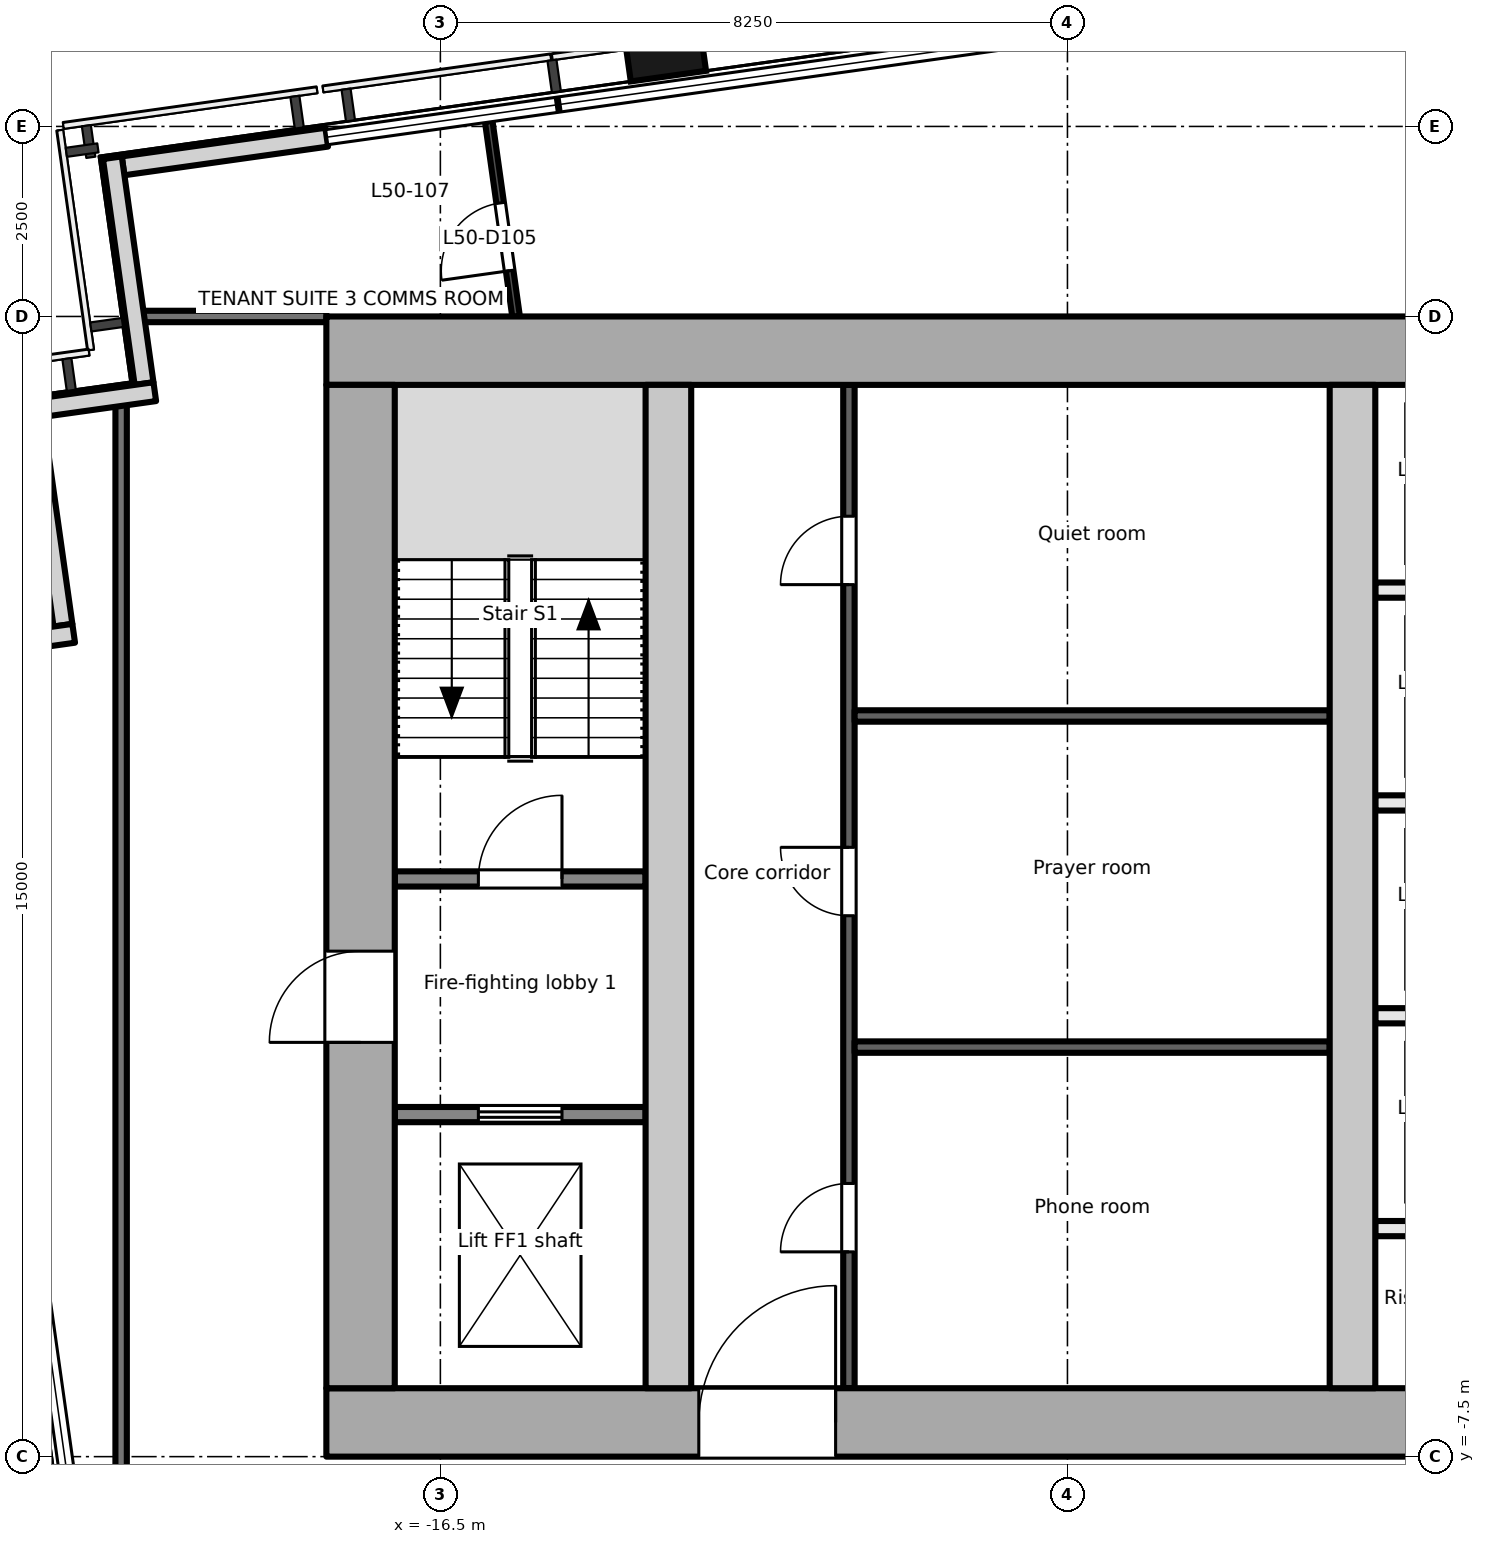
"""IFC4 building model, lengths in metres.
Left out: names, types, materials, properties, quantities, classifications, styles, units other than length and angle.
Written with IfcOpenShell. Run it as: python <this file> out.ifc"""

import sys

from ifc_helpers import new_model, si_unit, direction, frame, frame_2d, origin, origin_2d, place, context, subcontext, project, spatial, rectangle, extrude, element, fill, save


model = new_model("IFC4")
c1 = context("Model", 3, precision=1e-05, world=origin(), true_north=direction((0.0, 1.0)))
c2 = subcontext(c1, "Body", "Model", "MODEL_VIEW")
j1 = project(units=[si_unit("LENGTHUNIT", "METRE"), si_unit("PLANEANGLEUNIT", "RADIAN")], contexts=[c1])
p1 = place(None, origin())
s1 = spatial("IfcSite", under=j1, at=p1, CompositionType="ELEMENT")
p2 = place(p1, origin())
s2 = spatial("IfcBuilding", under=s1, at=p2, CompositionType="ELEMENT")
p3 = place(p2, frame((0.0, 0.0, 221.3)))
s3 = spatial("IfcBuildingStorey", under=s2, at=p3, CompositionType="ELEMENT", Elevation=221.3)
p4 = place(p3, frame((-13.625, 11.553, -0.2), z_axis=(0.0, 0.0, 1.0), x_axis=(0.990268068742, 0.13917310096, 0.0)))
e1 = element("IfcColumn", 1, at=p4, inside=s3, PredefinedType="COLUMN", context=c2, shape_type="SweptSolid", body=[
    extrude(rectangle(XDim=1.0, YDim=1.8, at=origin_2d()), origin(), (0.0, 0.0, 1.0), 3.9),
])
p5 = place(p3, frame((-17.995, 9.859, 0.0), z_axis=(0.0, 0.0, 1.0), x_axis=(-0.99024510326, -0.139336411139, 0.0)))
e2 = element("IfcWall", 2, at=p5, inside=s3, PredefinedType="SOLIDWALL", context=c2, shape_type="SweptSolid", body=[
    extrude(rectangle(XDim=2.705, YDim=0.25, at=frame_2d((1.353, 0.0))), origin(), (0.0, 0.0, 1.0), 3.7),
])
p6 = place(p3, frame((-20.815, 9.588, 0.0), z_axis=(0.0, 0.0, 1.0), x_axis=(0.138983028379, -0.9902947631, 0.0)))
e3 = element("IfcWall", 3, at=p6, inside=s3, PredefinedType="SOLIDWALL", context=c2, shape_type="SweptSolid", body=[
    extrude(rectangle(XDim=3.0, YDim=0.25, at=frame_2d((1.5, 0.0))), origin(), (0.0, 0.0, 1.0), 3.7),
])
p7 = place(p3, frame((-20.257, 6.51, 0.0), z_axis=(0.0, 0.0, 1.0), x_axis=(-0.990330117064, -0.138730887823, 0.0)))
e4 = element("IfcWall", 4, at=p7, inside=s3, PredefinedType="SOLIDWALL", context=c2, shape_type="SweptSolid", body=[
    extrude(rectangle(XDim=1.499, YDim=0.25, at=frame_2d((0.75, 0.0))), origin(), (0.0, 0.0, 1.0), 3.7),
])
p8 = place(p3, frame((-21.883, 6.409, 0.0), z_axis=(0.0, 0.0, 1.0), x_axis=(0.139324658755, -0.990246756855, 0.0)))
e5 = element("IfcWall", 5, at=p8, inside=s3, PredefinedType="SOLIDWALL", context=c2, shape_type="SweptSolid", body=[
    extrude(rectangle(XDim=3.0, YDim=0.25, at=frame_2d((1.5, 0.0))), origin(), (0.0, 0.0, 1.0), 3.7),
])
p9 = place(p3, frame((-21.324, 3.332, 0.0), z_axis=(0.0, 0.0, 1.0), x_axis=(-0.990238641016, -0.139382329723, 0.0)))
e6 = element("IfcWall", 6, at=p9, inside=s3, PredefinedType="SOLIDWALL", context=c2, shape_type="SweptSolid", body=[
    extrude(rectangle(XDim=1.526, YDim=0.25, at=frame_2d((0.763, 0.0))), origin(), (0.0, 0.0, 1.0), 3.7),
])
p10 = place(p3, frame((-18.0, -7.05, -0.2), z_axis=(0.0, 0.0, 1.0), x_axis=(1.0, 0.0, 0.0)))
e7 = element("IfcWall", 7, at=p10, inside=s3, PredefinedType="SHEAR", context=c2, shape_type="SweptSolid", body=[
    extrude(rectangle(XDim=36.0, YDim=0.9, at=frame_2d((18.0, 0.0))), origin(), (0.0, 0.0, 1.0), 3.9),
])
p11 = place(p10, frame((4.9, 0.0, 0.2)))
e8 = element("IfcOpeningElement", 8, at=p11, cuts=e7, PredefinedType="OPENING", context=c2, shape_type="SweptSolid", body=[
    extrude(rectangle(XDim=1.8, YDim=2.1, at=frame_2d((0.9, 1.05))), frame((0.0, 0.46, 0.0), z_axis=(0.0, -1.0, 0.0), x_axis=(1.0, 0.0, 0.0)), (0.0, 0.0, 1.0), 0.921),
])
p12 = place(p10, frame((16.8, 0.0, 0.2)))
e9 = element("IfcOpeningElement", 9, at=p12, cuts=e7, PredefinedType="OPENING", context=c2, shape_type="SweptSolid", body=[
    extrude(rectangle(XDim=2.4, YDim=2.1, at=frame_2d((1.2, 1.05))), frame((0.0, 0.46, 0.0), z_axis=(0.0, -1.0, 0.0), x_axis=(1.0, 0.0, 0.0)), (0.0, 0.0, 1.0), 0.921),
])
p13 = place(p10, frame((26.1, 0.0, 0.2)))
e10 = element("IfcOpeningElement", 10, at=p13, cuts=e7, PredefinedType="OPENING", context=c2, shape_type="SweptSolid", body=[
    extrude(rectangle(XDim=2.4, YDim=2.1, at=frame_2d((1.2, 1.05))), frame((0.0, 0.46, 0.0), z_axis=(0.0, -1.0, 0.0), x_axis=(1.0, 0.0, 0.0)), (0.0, 0.0, 1.0), 0.921),
])
p14 = place(p3, frame((-18.0, 7.05, -0.2), z_axis=(0.0, 0.0, 1.0), x_axis=(1.0, 0.0, 0.0)))
e11 = element("IfcWall", 11, at=p14, inside=s3, PredefinedType="SHEAR", context=c2, shape_type="SweptSolid", body=[
    extrude(rectangle(XDim=36.0, YDim=0.9, at=frame_2d((18.0, 0.0))), origin(), (0.0, 0.0, 1.0), 3.9),
])
p15 = place(p3, frame((-17.55, -6.6, -0.2), z_axis=(0.0, 0.0, 1.0), x_axis=(0.0, 1.0, 0.0)))
e12 = element("IfcWall", 12, at=p15, inside=s3, PredefinedType="SHEAR", context=c2, shape_type="SweptSolid", body=[
    extrude(rectangle(XDim=13.2, YDim=0.9, at=frame_2d((6.6, 0.0))), origin(), (0.0, 0.0, 1.0), 3.9),
])
p16 = place(p15, frame((4.55, 0.0, 0.2)))
e13 = element("IfcOpeningElement", 13, at=p16, cuts=e12, PredefinedType="OPENING", context=c2, shape_type="SweptSolid", body=[
    extrude(rectangle(XDim=1.2, YDim=2.1, at=frame_2d((0.6, 1.05))), frame((0.0, 0.46, 0.0), z_axis=(0.0, -1.0, 0.0), x_axis=(1.0, 0.0, 0.0)), (0.0, 0.0, 1.0), 0.921),
])
for number, where, z_axis, x_axis in (
    (14, (-13.5, -6.6, -0.2), (0.0, 0.0, 1.0), (0.0, 1.0, 0.0)),
    (15, (-4.5, -6.6, -0.2), (0.0, 0.0, 1.0), (0.0, 1.0, 0.0)),
):
    element("IfcWall", number, at=place(p3, frame(where, z_axis=z_axis, x_axis=x_axis)), inside=s3, PredefinedType="SHEAR", context=c2, shape_type="SweptSolid", body=[
        extrude(rectangle(XDim=13.2, YDim=0.6, at=frame_2d((6.6, 0.0))), origin(), (0.0, 0.0, 1.0), 3.9),
    ])
p17 = place(p3, frame((-17.1, -3.0, 0.0), z_axis=(0.0, 0.0, 1.0), x_axis=(1.0, 0.0, 0.0)))
e16 = element("IfcWall", 16, at=p17, inside=s3, PredefinedType="PARTITIONING", context=c2, shape_type="SweptSolid", body=[
    extrude(rectangle(XDim=3.3, YDim=0.2, at=frame_2d((1.65, 0.0))), origin(), (0.0, 0.0, 1.0), 3.7),
])
p18 = place(p17, frame((1.1, 0.0, 0.0)))
e17 = element("IfcOpeningElement", 17, at=p18, cuts=e16, PredefinedType="OPENING", context=c2, shape_type="SweptSolid", body=[
    extrude(rectangle(XDim=1.1, YDim=2.1, at=frame_2d((0.55, 1.05))), frame((0.0, 0.111, 0.0), z_axis=(0.0, -1.0, 0.0), x_axis=(1.0, 0.0, 0.0)), (0.0, 0.0, 1.0), 0.221),
])
p19 = place(p3, frame((-17.1, 0.1, 0.0), z_axis=(0.0, 0.0, 1.0), x_axis=(1.0, 0.0, 0.0)))
e18 = element("IfcWall", 18, at=p19, inside=s3, PredefinedType="PARTITIONING", context=c2, shape_type="SweptSolid", body=[
    extrude(rectangle(XDim=3.3, YDim=0.2, at=frame_2d((1.65, 0.0))), origin(), (0.0, 0.0, 1.0), 3.7),
])
p20 = place(p19, frame((1.1, 0.0, 0.0)))
e19 = element("IfcOpeningElement", 19, at=p20, cuts=e18, PredefinedType="OPENING", context=c2, shape_type="SweptSolid", body=[
    extrude(rectangle(XDim=1.1, YDim=2.1, at=frame_2d((0.55, 1.05))), frame((0.0, 0.111, 0.0), z_axis=(0.0, -1.0, 0.0), x_axis=(1.0, 0.0, 0.0)), (0.0, 0.0, 1.0), 0.221),
])
p21 = place(p3, frame((-11.125, -6.6, 0.0), z_axis=(0.0, 0.0, 1.0), x_axis=(0.0, 1.0, 0.0)))
e20 = element("IfcWall", 20, at=p21, inside=s3, PredefinedType="PARTITIONING", context=c2, shape_type="SweptSolid", body=[
    extrude(rectangle(XDim=13.2, YDim=0.15, at=frame_2d((6.6, 0.0))), origin(), (0.0, 0.0, 1.0), 3.7),
])
p22 = place(p21, frame((1.794, 0.0, 0.0)))
e21 = element("IfcOpeningElement", 21, at=p22, cuts=e20, PredefinedType="OPENING", context=c2, shape_type="SweptSolid", body=[
    extrude(rectangle(XDim=0.9, YDim=2.1, at=frame_2d((0.45, 1.05))), frame((0.0, 0.085, 0.0), z_axis=(0.0, -1.0, 0.0), x_axis=(1.0, 0.0, 0.0)), (0.0, 0.0, 1.0), 0.171),
])
p23 = place(p21, frame((6.216, 0.0, 0.0)))
e22 = element("IfcOpeningElement", 22, at=p23, cuts=e20, PredefinedType="OPENING", context=c2, shape_type="SweptSolid", body=[
    extrude(rectangle(XDim=0.9, YDim=2.1, at=frame_2d((0.45, 1.05))), frame((0.0, 0.085, 0.0), z_axis=(0.0, -1.0, 0.0), x_axis=(1.0, 0.0, 0.0)), (0.0, 0.0, 1.0), 0.171),
])
p24 = place(p21, frame((10.572, 0.0, 0.0)))
e23 = element("IfcOpeningElement", 23, at=p24, cuts=e20, PredefinedType="OPENING", context=c2, shape_type="SweptSolid", body=[
    extrude(rectangle(XDim=0.9, YDim=2.1, at=frame_2d((0.45, 1.05))), frame((0.0, 0.085, 0.0), z_axis=(0.0, -1.0, 0.0), x_axis=(1.0, 0.0, 0.0)), (0.0, 0.0, 1.0), 0.171),
])
for number, where, z_axis, x_axis in (
    (24, (-11.05, -2.112, 0.0), (0.0, 0.0, 1.0), (1.0, 0.0, 0.0)),
    (25, (-11.05, 2.244, 0.0), (0.0, 0.0, 1.0), (1.0, 0.0, 0.0)),
):
    element("IfcWall", number, at=place(p3, frame(where, z_axis=z_axis, x_axis=x_axis)), inside=s3, PredefinedType="PARTITIONING", context=c2, shape_type="SweptSolid", body=[
        extrude(rectangle(XDim=6.25, YDim=0.15, at=frame_2d((3.125, 0.0))), origin(), (0.0, 0.0, 1.0), 3.7),
    ])
for number, where, z_axis, x_axis in (
    (26, (-4.2, -1.7, 0.0), (0.0, 0.0, 1.0), (1.0, 0.0, 0.0)),
    (27, (-4.2, 1.1, 0.0), (0.0, 0.0, 1.0), (1.0, 0.0, 0.0)),
    (28, (-4.2, 3.9, 0.0), (0.0, 0.0, 1.0), (1.0, 0.0, 0.0)),
    (29, (-4.2, -4.5, 0.0), (0.0, 0.0, 1.0), (1.0, 0.0, 0.0)),
):
    element("IfcWall", number, at=place(p3, frame(where, z_axis=z_axis, x_axis=x_axis)), inside=s3, PredefinedType="PARTITIONING", context=c2, shape_type="SweptSolid", body=[
        extrude(rectangle(XDim=2.3, YDim=0.2, at=frame_2d((1.15, 0.0))), origin(), (0.0, 0.0, 1.0), 3.7),
    ])
p25 = place(p3, frame((-20.7, -10.8, 0.0), z_axis=(0.0, 0.0, 1.0), x_axis=(0.0, 1.0, 0.0)))
e30 = element("IfcWall", 30, at=p25, inside=s3, PredefinedType="PARTITIONING", context=c2, shape_type="SweptSolid", body=[
    extrude(rectangle(XDim=17.156, YDim=0.15, at=frame_2d((8.578, 0.0))), origin(), (0.0, 0.0, 1.0), 3.4),
])
p26 = place(p3, frame((-20.431, 7.5, 0.0), z_axis=(0.0, 0.0, 1.0), x_axis=(1.0, 0.0, 0.0)))
e31 = element("IfcWall", 31, at=p26, inside=s3, PredefinedType="PARTITIONING", context=c2, shape_type="SweptSolid", body=[
    extrude(rectangle(XDim=2.431, YDim=0.15, at=frame_2d((1.215, 0.0))), origin(), (0.0, 0.0, 1.0), 3.7),
])
p27 = place(p3, frame((-15.504, 7.5, 0.0), z_axis=(0.0, 0.0, 1.0), x_axis=(-0.138928669032, 0.990302390647, 0.0)))
e32 = element("IfcWall", 32, at=p27, inside=s3, PredefinedType="PARTITIONING", context=c2, shape_type="SweptSolid", body=[
    extrude(rectangle(XDim=2.592, YDim=0.1, at=frame_2d((1.296, 0.0))), origin(), (0.0, 0.0, 1.0), 3.7),
])
p28 = place(p27, frame((0.608, 0.0, 0.0)))
e33 = element("IfcOpeningElement", 33, at=p28, cuts=e32, PredefinedType="OPENING", context=c2, shape_type="SweptSolid", body=[
    extrude(rectangle(XDim=0.9, YDim=2.1, at=frame_2d((0.45, 1.05))), frame((0.0, 0.061, 0.0), z_axis=(0.0, -1.0, 0.0), x_axis=(1.0, 0.0, 0.0)), (0.0, 0.0, 1.0), 0.121),
])
p29 = place(p18, origin())
e34 = element("IfcDoor", 34, at=p29, inside=s3, OperationType="DOUBLE_DOOR_SLIDING", PredefinedType="DOOR", context=c2, shape_type="SweptSolid", body=[
    extrude(rectangle(XDim=1.1, YDim=2.1, at=frame_2d((0.55, 1.05))), frame((0.0, 0.025, 0.0), z_axis=(0.0, -1.0, 0.0), x_axis=(1.0, 0.0, 0.0)), (0.0, 0.0, 1.0), 0.05),
])
fill(e17, e34)
p30 = place(p16, origin())
e35 = element("IfcDoor", 35, at=p30, inside=s3, OperationType="SINGLE_SWING_LEFT", PredefinedType="DOOR", context=c2, shape_type="SweptSolid", body=[
    extrude(rectangle(XDim=1.2, YDim=2.1, at=frame_2d((0.6, 1.05))), frame((0.0, 0.025, 0.0), z_axis=(0.0, -1.0, 0.0), x_axis=(1.0, 0.0, 0.0)), (0.0, 0.0, 1.0), 0.05),
])
fill(e13, e35)
p31 = place(p20, origin())
e36 = element("IfcDoor", 36, at=p31, inside=s3, OperationType="SINGLE_SWING_RIGHT", PredefinedType="DOOR", context=c2, shape_type="SweptSolid", body=[
    extrude(rectangle(XDim=1.1, YDim=2.1, at=frame_2d((0.55, 1.05))), frame((0.0, 0.025, 0.0), z_axis=(0.0, -1.0, 0.0), x_axis=(1.0, 0.0, 0.0)), (0.0, 0.0, 1.0), 0.05),
])
fill(e19, e36)
p32 = place(p22, origin())
e37 = element("IfcDoor", 37, at=p32, inside=s3, OperationType="SINGLE_SWING_LEFT", PredefinedType="DOOR", context=c2, shape_type="SweptSolid", body=[
    extrude(rectangle(XDim=0.9, YDim=2.1, at=frame_2d((0.45, 1.05))), frame((0.0, 0.025, 0.0), z_axis=(0.0, -1.0, 0.0), x_axis=(1.0, 0.0, 0.0)), (0.0, 0.0, 1.0), 0.05),
])
fill(e21, e37)
p33 = place(p23, origin())
e38 = element("IfcDoor", 38, at=p33, inside=s3, OperationType="SINGLE_SWING_RIGHT", PredefinedType="DOOR", context=c2, shape_type="SweptSolid", body=[
    extrude(rectangle(XDim=0.9, YDim=2.1, at=frame_2d((0.45, 1.05))), frame((0.0, 0.025, 0.0), z_axis=(0.0, -1.0, 0.0), x_axis=(1.0, 0.0, 0.0)), (0.0, 0.0, 1.0), 0.05),
])
fill(e22, e38)
p34 = place(p24, origin())
e39 = element("IfcDoor", 39, at=p34, inside=s3, OperationType="SINGLE_SWING_LEFT", PredefinedType="DOOR", context=c2, shape_type="SweptSolid", body=[
    extrude(rectangle(XDim=0.9, YDim=2.1, at=frame_2d((0.45, 1.05))), frame((0.0, 0.025, 0.0), z_axis=(0.0, -1.0, 0.0), x_axis=(1.0, 0.0, 0.0)), (0.0, 0.0, 1.0), 0.05),
])
fill(e23, e39)
p35 = place(p11, origin())
e40 = element("IfcDoor", 40, at=p35, inside=s3, OperationType="SINGLE_SWING_RIGHT", PredefinedType="DOOR", context=c2, shape_type="SweptSolid", body=[
    extrude(rectangle(XDim=1.8, YDim=2.1, at=frame_2d((0.9, 1.05))), frame((0.0, 0.025, 0.0), z_axis=(0.0, -1.0, 0.0), x_axis=(1.0, 0.0, 0.0)), (0.0, 0.0, 1.0), 0.05),
])
fill(e8, e40)
p36 = place(p28, origin())
e41 = element("IfcDoor", 41, at=p36, inside=s3, OperationType="SINGLE_SWING_LEFT", PredefinedType="DOOR", context=c2, shape_type="SweptSolid", body=[
    extrude(rectangle(XDim=0.9, YDim=2.1, at=frame_2d((0.45, 1.05))), frame((0.0, 0.025, 0.0), z_axis=(0.0, -1.0, 0.0), x_axis=(1.0, 0.0, 0.0)), (0.0, 0.0, 1.0), 0.05),
])
fill(e33, e41)
save(model, sys.argv[1])
